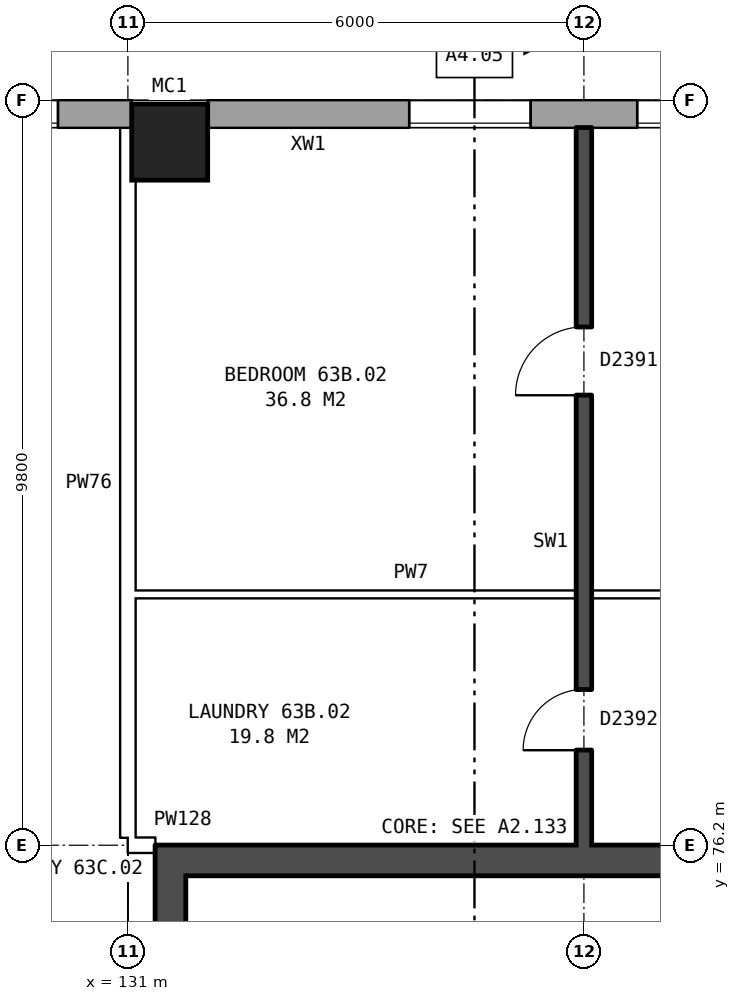
"""IFC4 building model, lengths in metres.
Left out: names, types, materials, properties, quantities, classifications, styles, units other than length and angle.
Written with IfcOpenShell. Run it as: python <this file> out.ifc"""

import sys

from ifc_helpers import new_model, si_unit, direction, frame, frame_2d, origin, origin_2d, place, context, subcontext, project, spatial, rectangle, hollow_rectangle, extrude, element, fill, save


model = new_model("IFC4")
c1 = context("Model", 3, precision=1e-05, world=origin(), true_north=direction((0.0, 1.0)))
c2 = subcontext(c1, "Body", "Model", "MODEL_VIEW")
j1 = project(units=[si_unit("LENGTHUNIT", "METRE"), si_unit("PLANEANGLEUNIT", "RADIAN")], contexts=[c1])
p1 = place(None, origin())
s1 = spatial("IfcSite", under=j1, at=p1, CompositionType="ELEMENT")
p2 = place(p1, origin())
s2 = spatial("IfcBuilding", under=s1, at=p2, CompositionType="ELEMENT")
p3 = place(p2, frame((0.0, 0.0, 224.5)))
s3 = spatial("IfcBuildingStorey", under=s2, at=p3, CompositionType="ELEMENT", Elevation=224.5)
p4 = place(p3, frame((131.55, 85.45, 0.0), z_axis=(0.0, 0.0, 1.0), x_axis=(1.0, 0.0, 0.0)))
e1 = element("IfcColumn", 1, at=p4, inside=s3, PredefinedType="COLUMN", context=c2, shape_type="SweptSolid", body=[
    extrude(hollow_rectangle(XDim=1.0, YDim=1.0, WallThickness=0.055, at=origin_2d()), origin(), (0.0, 0.0, 1.0), 3.1),
])
p5 = place(p3, frame((165.925, 85.82, 0.0), z_axis=(0.0, 0.0, 1.0), x_axis=(-1.0, 0.0, 0.0)))
e2 = element("IfcWall", 2, at=p5, inside=s3, PredefinedType="STANDARD", context=c2, shape_type="SweptSolid", body=[
    extrude(rectangle(XDim=33.875, YDim=0.36, at=frame_2d((16.938, 0.0))), origin(), (0.0, 0.0, 1.0), 2.85),
])
p6 = place(p5, frame((2.625, 0.0, 0.8)))
e3 = element("IfcOpeningElement", 3, at=p6, cuts=e2, PredefinedType="OPENING", context=c2, shape_type="SweptSolid", body=[
    extrude(rectangle(XDim=1.6, YDim=1.8, at=frame_2d((0.8, 0.9))), frame((0.0, 0.19, 0.0), z_axis=(0.0, -1.0, 0.0), x_axis=(1.0, 0.0, 0.0)), (0.0, 0.0, 1.0), 0.38),
])
p7 = place(p5, frame((5.625, 0.0, 0.8)))
e4 = element("IfcOpeningElement", 4, at=p7, cuts=e2, PredefinedType="OPENING", context=c2, shape_type="SweptSolid", body=[
    extrude(rectangle(XDim=1.6, YDim=1.8, at=frame_2d((0.8, 0.9))), frame((0.0, 0.19, 0.0), z_axis=(0.0, -1.0, 0.0), x_axis=(1.0, 0.0, 0.0)), (0.0, 0.0, 1.0), 0.38),
])
p8 = place(p5, frame((7.525, 0.0, 0.8)))
e5 = element("IfcOpeningElement", 5, at=p8, cuts=e2, PredefinedType="OPENING", context=c2, shape_type="SweptSolid", body=[
    extrude(rectangle(XDim=1.6, YDim=1.8, at=frame_2d((0.8, 0.9))), frame((0.0, 0.19, 0.0), z_axis=(0.0, -1.0, 0.0), x_axis=(1.0, 0.0, 0.0)), (0.0, 0.0, 1.0), 0.38),
])
p9 = place(p5, frame((11.625, 0.0, 0.8)))
e6 = element("IfcOpeningElement", 6, at=p9, cuts=e2, PredefinedType="OPENING", context=c2, shape_type="SweptSolid", body=[
    extrude(rectangle(XDim=1.6, YDim=1.8, at=frame_2d((0.8, 0.9))), frame((0.0, 0.19, 0.0), z_axis=(0.0, -1.0, 0.0), x_axis=(1.0, 0.0, 0.0)), (0.0, 0.0, 1.0), 0.38),
])
p10 = place(p5, frame((14.625, 0.0, 0.8)))
e7 = element("IfcOpeningElement", 7, at=p10, cuts=e2, PredefinedType="OPENING", context=c2, shape_type="SweptSolid", body=[
    extrude(rectangle(XDim=1.6, YDim=1.8, at=frame_2d((0.8, 0.9))), frame((0.0, 0.19, 0.0), z_axis=(0.0, -1.0, 0.0), x_axis=(1.0, 0.0, 0.0)), (0.0, 0.0, 1.0), 0.38),
])
p11 = place(p5, frame((17.625, 0.0, 0.8)))
e8 = element("IfcOpeningElement", 8, at=p11, cuts=e2, PredefinedType="OPENING", context=c2, shape_type="SweptSolid", body=[
    extrude(rectangle(XDim=1.6, YDim=1.8, at=frame_2d((0.8, 0.9))), frame((0.0, 0.19, 0.0), z_axis=(0.0, -1.0, 0.0), x_axis=(1.0, 0.0, 0.0)), (0.0, 0.0, 1.0), 0.38),
])
p12 = place(p5, frame((20.075, 0.0, 0.8)))
e9 = element("IfcOpeningElement", 9, at=p12, cuts=e2, PredefinedType="OPENING", context=c2, shape_type="SweptSolid", body=[
    extrude(rectangle(XDim=0.6, YDim=1.5, at=frame_2d((0.3, 0.75))), frame((0.0, 0.19, 0.0), z_axis=(0.0, -1.0, 0.0), x_axis=(1.0, 0.0, 0.0)), (0.0, 0.0, 1.0), 0.38),
])
p13 = place(p5, frame((23.625, 0.0, 0.8)))
e10 = element("IfcOpeningElement", 10, at=p13, cuts=e2, PredefinedType="OPENING", context=c2, shape_type="SweptSolid", body=[
    extrude(rectangle(XDim=1.6, YDim=1.8, at=frame_2d((0.8, 0.9))), frame((0.0, 0.19, 0.0), z_axis=(0.0, -1.0, 0.0), x_axis=(1.0, 0.0, 0.0)), (0.0, 0.0, 1.0), 0.38),
])
p14 = place(p5, frame((26.625, 0.0, 0.8)))
e11 = element("IfcOpeningElement", 11, at=p14, cuts=e2, PredefinedType="OPENING", context=c2, shape_type="SweptSolid", body=[
    extrude(rectangle(XDim=1.6, YDim=1.8, at=frame_2d((0.8, 0.9))), frame((0.0, 0.19, 0.0), z_axis=(0.0, -1.0, 0.0), x_axis=(1.0, 0.0, 0.0)), (0.0, 0.0, 1.0), 0.38),
])
p15 = place(p5, frame((29.625, 0.0, 0.8)))
e12 = element("IfcOpeningElement", 12, at=p15, cuts=e2, PredefinedType="OPENING", context=c2, shape_type="SweptSolid", body=[
    extrude(rectangle(XDim=1.6, YDim=1.8, at=frame_2d((0.8, 0.9))), frame((0.0, 0.19, 0.0), z_axis=(0.0, -1.0, 0.0), x_axis=(1.0, 0.0, 0.0)), (0.0, 0.0, 1.0), 0.38),
])
p16 = place(p5, frame((22.125, 0.0, 1.7)))
e13 = element("IfcOpeningElement", 13, at=p16, cuts=e2, PredefinedType="OPENING", context=c2, shape_type="SweptSolid", body=[
    extrude(rectangle(XDim=0.6, YDim=0.9, at=frame_2d((0.3, 0.45))), frame((0.0, 0.19, 0.0), z_axis=(0.0, -1.0, 0.0), x_axis=(1.0, 0.0, 0.0)), (0.0, 0.0, 1.0), 0.38),
])
p17 = place(p3, frame((131.05, 85.82, 0.0), z_axis=(0.0, 0.0, 1.0), x_axis=(-1.0, 0.0, 0.0)))
e14 = element("IfcWall", 14, at=p17, inside=s3, PredefinedType="STANDARD", context=c2, shape_type="SweptSolid", body=[
    extrude(rectangle(XDim=55.1, YDim=0.36, at=frame_2d((27.55, 0.0))), origin(), (0.0, 0.0, 1.0), 2.85),
])
p18 = place(p17, frame((0.969, 0.0, 0.8)))
e15 = element("IfcOpeningElement", 15, at=p18, cuts=e14, PredefinedType="OPENING", context=c2, shape_type="SweptSolid", body=[
    extrude(rectangle(XDim=1.6, YDim=1.8, at=frame_2d((0.8, 0.9))), frame((0.0, 0.19, 0.0), z_axis=(0.0, -1.0, 0.0), x_axis=(1.0, 0.0, 0.0)), (0.0, 0.0, 1.0), 0.38),
])
p19 = place(p17, frame((4.406, 0.0, 0.8)))
e16 = element("IfcOpeningElement", 16, at=p19, cuts=e14, PredefinedType="OPENING", context=c2, shape_type="SweptSolid", body=[
    extrude(rectangle(XDim=1.6, YDim=1.8, at=frame_2d((0.8, 0.9))), frame((0.0, 0.19, 0.0), z_axis=(0.0, -1.0, 0.0), x_axis=(1.0, 0.0, 0.0)), (0.0, 0.0, 1.0), 0.38),
])
p20 = place(p17, frame((7.844, 0.0, 0.8)))
e17 = element("IfcOpeningElement", 17, at=p20, cuts=e14, PredefinedType="OPENING", context=c2, shape_type="SweptSolid", body=[
    extrude(rectangle(XDim=1.6, YDim=1.8, at=frame_2d((0.8, 0.9))), frame((0.0, 0.19, 0.0), z_axis=(0.0, -1.0, 0.0), x_axis=(1.0, 0.0, 0.0)), (0.0, 0.0, 1.0), 0.38),
])
p21 = place(p17, frame((11.281, 0.0, 0.8)))
e18 = element("IfcOpeningElement", 18, at=p21, cuts=e14, PredefinedType="OPENING", context=c2, shape_type="SweptSolid", body=[
    extrude(rectangle(XDim=1.6, YDim=1.8, at=frame_2d((0.8, 0.9))), frame((0.0, 0.19, 0.0), z_axis=(0.0, -1.0, 0.0), x_axis=(1.0, 0.0, 0.0)), (0.0, 0.0, 1.0), 0.38),
])
p22 = place(p17, frame((14.719, 0.0, 0.8)))
e19 = element("IfcOpeningElement", 19, at=p22, cuts=e14, PredefinedType="OPENING", context=c2, shape_type="SweptSolid", body=[
    extrude(rectangle(XDim=1.6, YDim=1.8, at=frame_2d((0.8, 0.9))), frame((0.0, 0.19, 0.0), z_axis=(0.0, -1.0, 0.0), x_axis=(1.0, 0.0, 0.0)), (0.0, 0.0, 1.0), 0.38),
])
p23 = place(p17, frame((18.156, 0.0, 0.8)))
e20 = element("IfcOpeningElement", 20, at=p23, cuts=e14, PredefinedType="OPENING", context=c2, shape_type="SweptSolid", body=[
    extrude(rectangle(XDim=1.6, YDim=1.8, at=frame_2d((0.8, 0.9))), frame((0.0, 0.19, 0.0), z_axis=(0.0, -1.0, 0.0), x_axis=(1.0, 0.0, 0.0)), (0.0, 0.0, 1.0), 0.38),
])
p24 = place(p17, frame((21.594, 0.0, 0.8)))
e21 = element("IfcOpeningElement", 21, at=p24, cuts=e14, PredefinedType="OPENING", context=c2, shape_type="SweptSolid", body=[
    extrude(rectangle(XDim=1.6, YDim=1.8, at=frame_2d((0.8, 0.9))), frame((0.0, 0.19, 0.0), z_axis=(0.0, -1.0, 0.0), x_axis=(1.0, 0.0, 0.0)), (0.0, 0.0, 1.0), 0.38),
])
p25 = place(p17, frame((25.031, 0.0, 0.8)))
e22 = element("IfcOpeningElement", 22, at=p25, cuts=e14, PredefinedType="OPENING", context=c2, shape_type="SweptSolid", body=[
    extrude(rectangle(XDim=1.6, YDim=1.8, at=frame_2d((0.8, 0.9))), frame((0.0, 0.19, 0.0), z_axis=(0.0, -1.0, 0.0), x_axis=(1.0, 0.0, 0.0)), (0.0, 0.0, 1.0), 0.38),
])
p26 = place(p17, frame((28.469, 0.0, 0.8)))
e23 = element("IfcOpeningElement", 23, at=p26, cuts=e14, PredefinedType="OPENING", context=c2, shape_type="SweptSolid", body=[
    extrude(rectangle(XDim=1.6, YDim=1.8, at=frame_2d((0.8, 0.9))), frame((0.0, 0.19, 0.0), z_axis=(0.0, -1.0, 0.0), x_axis=(1.0, 0.0, 0.0)), (0.0, 0.0, 1.0), 0.38),
])
p27 = place(p17, frame((31.906, 0.0, 0.8)))
e24 = element("IfcOpeningElement", 24, at=p27, cuts=e14, PredefinedType="OPENING", context=c2, shape_type="SweptSolid", body=[
    extrude(rectangle(XDim=1.6, YDim=1.8, at=frame_2d((0.8, 0.9))), frame((0.0, 0.19, 0.0), z_axis=(0.0, -1.0, 0.0), x_axis=(1.0, 0.0, 0.0)), (0.0, 0.0, 1.0), 0.38),
])
p28 = place(p17, frame((35.344, 0.0, 0.8)))
e25 = element("IfcOpeningElement", 25, at=p28, cuts=e14, PredefinedType="OPENING", context=c2, shape_type="SweptSolid", body=[
    extrude(rectangle(XDim=1.6, YDim=1.8, at=frame_2d((0.8, 0.9))), frame((0.0, 0.19, 0.0), z_axis=(0.0, -1.0, 0.0), x_axis=(1.0, 0.0, 0.0)), (0.0, 0.0, 1.0), 0.38),
])
p29 = place(p17, frame((38.781, 0.0, 0.8)))
e26 = element("IfcOpeningElement", 26, at=p29, cuts=e14, PredefinedType="OPENING", context=c2, shape_type="SweptSolid", body=[
    extrude(rectangle(XDim=1.6, YDim=1.8, at=frame_2d((0.8, 0.9))), frame((0.0, 0.19, 0.0), z_axis=(0.0, -1.0, 0.0), x_axis=(1.0, 0.0, 0.0)), (0.0, 0.0, 1.0), 0.38),
])
p30 = place(p17, frame((42.219, 0.0, 0.8)))
e27 = element("IfcOpeningElement", 27, at=p30, cuts=e14, PredefinedType="OPENING", context=c2, shape_type="SweptSolid", body=[
    extrude(rectangle(XDim=1.6, YDim=1.8, at=frame_2d((0.8, 0.9))), frame((0.0, 0.19, 0.0), z_axis=(0.0, -1.0, 0.0), x_axis=(1.0, 0.0, 0.0)), (0.0, 0.0, 1.0), 0.38),
])
p31 = place(p17, frame((45.656, 0.0, 0.8)))
e28 = element("IfcOpeningElement", 28, at=p31, cuts=e14, PredefinedType="OPENING", context=c2, shape_type="SweptSolid", body=[
    extrude(rectangle(XDim=1.6, YDim=1.8, at=frame_2d((0.8, 0.9))), frame((0.0, 0.19, 0.0), z_axis=(0.0, -1.0, 0.0), x_axis=(1.0, 0.0, 0.0)), (0.0, 0.0, 1.0), 0.38),
])
p32 = place(p17, frame((49.094, 0.0, 0.8)))
e29 = element("IfcOpeningElement", 29, at=p32, cuts=e14, PredefinedType="OPENING", context=c2, shape_type="SweptSolid", body=[
    extrude(rectangle(XDim=1.6, YDim=1.8, at=frame_2d((0.8, 0.9))), frame((0.0, 0.19, 0.0), z_axis=(0.0, -1.0, 0.0), x_axis=(1.0, 0.0, 0.0)), (0.0, 0.0, 1.0), 0.38),
])
p33 = place(p17, frame((52.531, 0.0, 0.8)))
e30 = element("IfcOpeningElement", 30, at=p33, cuts=e14, PredefinedType="OPENING", context=c2, shape_type="SweptSolid", body=[
    extrude(rectangle(XDim=1.6, YDim=1.8, at=frame_2d((0.8, 0.9))), frame((0.0, 0.19, 0.0), z_axis=(0.0, -1.0, 0.0), x_axis=(1.0, 0.0, 0.0)), (0.0, 0.0, 1.0), 0.38),
])
p34 = place(p3, frame((131.56, 63.8, 0.0), z_axis=(0.0, 0.0, 1.0), x_axis=(0.0, 1.0, 0.0)))
e31 = element("IfcWall", 31, at=p34, inside=s3, PredefinedType="SHEAR", context=c2, shape_type="SweptSolid", body=[
    extrude(rectangle(XDim=12.4, YDim=0.4, at=frame_2d((6.2, 0.0))), origin(), (0.0, 0.0, 1.0), 2.85),
])
p35 = place(p34, frame((9.8, 0.0, 0.0)))
e32 = element("IfcOpeningElement", 32, at=p35, cuts=e31, PredefinedType="OPENING", context=c2, shape_type="SweptSolid", body=[
    extrude(rectangle(XDim=1.1, YDim=2.1, at=frame_2d((0.55, 1.05))), frame((0.0, 0.21, 0.0), z_axis=(0.0, -1.0, 0.0), x_axis=(1.0, 0.0, 0.0)), (0.0, 0.0, 1.0), 0.42),
])
p36 = place(p3, frame((139.36, 76.0, 0.0), z_axis=(0.0, 0.0, 1.0), x_axis=(-1.0, 0.0, 0.0)))
e33 = element("IfcWall", 33, at=p36, inside=s3, PredefinedType="SHEAR", context=c2, shape_type="SweptSolid", body=[
    extrude(rectangle(XDim=7.6, YDim=0.4, at=frame_2d((3.8, 0.0))), origin(), (0.0, 0.0, 1.0), 2.85),
])
p37 = place(p3, frame((131.0, 76.2, 0.0), z_axis=(0.0, 0.0, 1.0), x_axis=(1.0, 0.0, 0.0)))
e34 = element("IfcWall", 34, at=p37, inside=s3, PredefinedType="PARTITIONING", context=c2, shape_type="SweptSolid", body=[
    extrude(rectangle(XDim=0.36, YDim=0.2, at=frame_2d((0.18, 0.0))), origin(), (0.0, 0.0, 1.0), 2.85),
])
p38 = place(p3, frame((131.1, 79.5, 0.0), z_axis=(0.0, 0.0, 1.0), x_axis=(1.0, 0.0, 0.0)))
e35 = element("IfcWall", 35, at=p38, inside=s3, PredefinedType="PARTITIONING", context=c2, shape_type="SweptSolid", body=[
    extrude(rectangle(XDim=11.8, YDim=0.1, at=frame_2d((5.9, 0.0))), origin(), (0.0, 0.0, 1.0), 2.85),
])
p39 = place(p38, frame((7.25, 0.0, 0.0)))
e36 = element("IfcOpeningElement", 36, at=p39, cuts=e35, PredefinedType="OPENING", context=c2, shape_type="SweptSolid", body=[
    extrude(rectangle(XDim=0.9, YDim=2.1, at=frame_2d((0.45, 1.05))), frame((0.0, 0.06, 0.0), z_axis=(0.0, -1.0, 0.0), x_axis=(1.0, 0.0, 0.0)), (0.0, 0.0, 1.0), 0.12),
])
p40 = place(p38, frame((10.2, 0.0, 0.0)))
e37 = element("IfcOpeningElement", 37, at=p40, cuts=e35, PredefinedType="OPENING", context=c2, shape_type="SweptSolid", body=[
    extrude(rectangle(XDim=0.9, YDim=2.1, at=frame_2d((0.45, 1.05))), frame((0.0, 0.06, 0.0), z_axis=(0.0, -1.0, 0.0), x_axis=(1.0, 0.0, 0.0)), (0.0, 0.0, 1.0), 0.12),
])
p41 = place(p3, frame((131.0, 76.3, 0.0), z_axis=(0.0, 0.0, 1.0), x_axis=(0.0, 1.0, 0.0)))
e38 = element("IfcWall", 38, at=p41, inside=s3, PredefinedType="PARTITIONING", context=c2, shape_type="SweptSolid", body=[
    extrude(rectangle(XDim=9.34, YDim=0.2, at=frame_2d((4.67, 0.0))), origin(), (0.0, 0.0, 1.0), 2.85),
])
p42 = place(p3, frame((137.0, 76.2, 0.0), z_axis=(0.0, 0.0, 1.0), x_axis=(0.0, 1.0, 0.0)))
e39 = element("IfcWall", 39, at=p42, inside=s3, PredefinedType="SOLIDWALL", context=c2, shape_type="SweptSolid", body=[
    extrude(rectangle(XDim=9.44, YDim=0.2, at=frame_2d((4.72, 0.0))), origin(), (0.0, 0.0, 1.0), 2.85),
])
p43 = place(p42, frame((5.92, 0.0, 0.0)))
e40 = element("IfcOpeningElement", 40, at=p43, cuts=e39, PredefinedType="OPENING", context=c2, shape_type="SweptSolid", body=[
    extrude(rectangle(XDim=0.9, YDim=2.1, at=frame_2d((0.45, 1.05))), frame((0.0, 0.11, 0.0), z_axis=(0.0, -1.0, 0.0), x_axis=(1.0, 0.0, 0.0)), (0.0, 0.0, 1.0), 0.22),
])
p44 = place(p42, frame((1.25, 0.0, 0.0)))
e41 = element("IfcOpeningElement", 41, at=p44, cuts=e39, PredefinedType="OPENING", context=c2, shape_type="SweptSolid", body=[
    extrude(rectangle(XDim=0.8, YDim=2.1, at=frame_2d((0.4, 1.05))), frame((0.0, 0.11, 0.0), z_axis=(0.0, -1.0, 0.0), x_axis=(1.0, 0.0, 0.0)), (0.0, 0.0, 1.0), 0.22),
])
p45 = place(p14, origin())
e42 = element("IfcWindow", 42, at=p45, inside=s3, PartitioningType="SINGLE_PANEL", PredefinedType="WINDOW", context=c2, shape_type="SweptSolid", body=[
    extrude(rectangle(XDim=1.6, YDim=1.8, at=frame_2d((0.8, 0.9))), frame((0.0, 0.15, 0.0), z_axis=(0.0, -1.0, 0.0), x_axis=(1.0, 0.0, 0.0)), (0.0, 0.0, 1.0), 0.06),
])
fill(e11, e42)
p46 = place(p15, origin())
e43 = element("IfcWindow", 43, at=p46, inside=s3, PartitioningType="SINGLE_PANEL", PredefinedType="WINDOW", context=c2, shape_type="SweptSolid", body=[
    extrude(rectangle(XDim=1.6, YDim=1.8, at=frame_2d((0.8, 0.9))), frame((0.0, 0.15, 0.0), z_axis=(0.0, -1.0, 0.0), x_axis=(1.0, 0.0, 0.0)), (0.0, 0.0, 1.0), 0.06),
])
fill(e12, e43)
p47 = place(p18, origin())
e44 = element("IfcWindow", 44, at=p47, inside=s3, PartitioningType="SINGLE_PANEL", PredefinedType="WINDOW", context=c2, shape_type="SweptSolid", body=[
    extrude(rectangle(XDim=1.6, YDim=1.8, at=frame_2d((0.8, 0.9))), frame((0.0, 0.15, 0.0), z_axis=(0.0, -1.0, 0.0), x_axis=(1.0, 0.0, 0.0)), (0.0, 0.0, 1.0), 0.06),
])
fill(e15, e44)
p48 = place(p43, origin())
e45 = element("IfcDoor", 45, at=p48, inside=s3, OperationType="SINGLE_SWING_LEFT", PredefinedType="DOOR", context=c2, shape_type="SweptSolid", body=[
    extrude(rectangle(XDim=0.9, YDim=2.1, at=frame_2d((0.45, 1.05))), frame((0.0, 0.025, 0.0), z_axis=(0.0, -1.0, 0.0), x_axis=(1.0, 0.0, 0.0)), (0.0, 0.0, 1.0), 0.05),
])
fill(e40, e45)
p49 = place(p44, origin())
e46 = element("IfcDoor", 46, at=p49, inside=s3, OperationType="SINGLE_SWING_LEFT", PredefinedType="DOOR", context=c2, shape_type="SweptSolid", body=[
    extrude(rectangle(XDim=0.8, YDim=2.1, at=frame_2d((0.4, 1.05))), frame((0.0, 0.025, 0.0), z_axis=(0.0, -1.0, 0.0), x_axis=(1.0, 0.0, 0.0)), (0.0, 0.0, 1.0), 0.05),
])
fill(e41, e46)
save(model, sys.argv[1])
